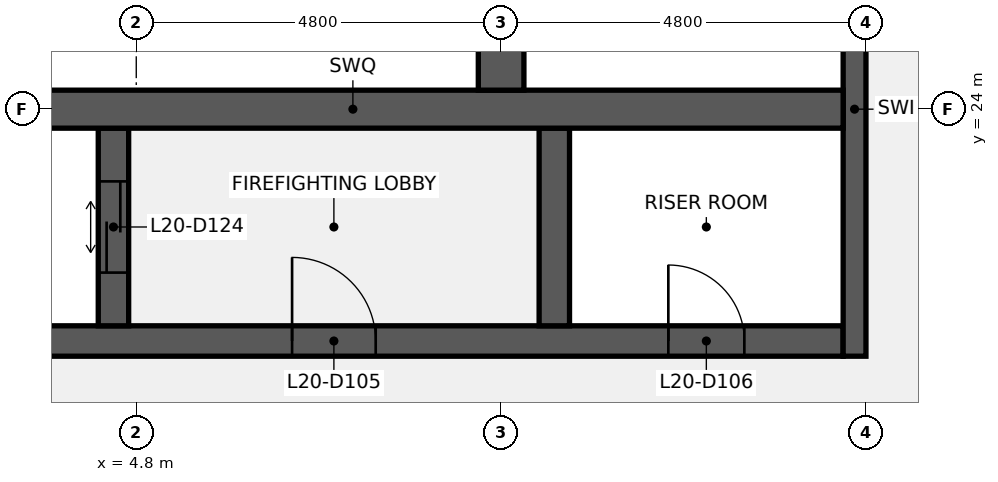
"""IFC4 building model, lengths in metres.
Left out: names, types, materials, properties, quantities, classifications, styles, units other than length and angle.
Written with IfcOpenShell. Run it as: python <this file> out.ifc"""

import sys

from ifc_helpers import new_model, si_unit, direction, frame, frame_2d, origin, place, context, subcontext, project, spatial, rectangle, extrude, element, fill, save


model = new_model("IFC4")
c1 = context("Model", 3, precision=1e-05, world=origin(), true_north=direction((0.0, 1.0)))
c2 = subcontext(c1, "Body", "Model", "MODEL_VIEW")
j1 = project(units=[si_unit("LENGTHUNIT", "METRE"), si_unit("PLANEANGLEUNIT", "RADIAN")], contexts=[c1])
p1 = place(None, origin())
s1 = spatial("IfcSite", under=j1, at=p1, CompositionType="ELEMENT")
p2 = place(p1, origin())
s2 = spatial("IfcBuilding", under=s1, at=p2, CompositionType="ELEMENT")
p3 = place(p2, frame((0.0, 0.0, 91.5)))
s3 = spatial("IfcBuildingStorey", under=s2, at=p3, CompositionType="ELEMENT", Elevation=91.5)
p4 = place(p3, frame((1.2, 20.95, 0.0), z_axis=(0.0, 0.0, 1.0), x_axis=(1.0, 0.0, 0.0)))
e1 = element("IfcWall", 1, at=p4, inside=s3, PredefinedType="SHEAR", context=c2, shape_type="SweptSolid", body=[
    extrude(rectangle(XDim=12.9, YDim=0.4, at=frame_2d((6.45, 0.0))), origin(), (0.0, 0.0, 1.0), 12.3),
])
p5 = place(p4, frame((5.65, 0.0, 0.0)))
e2 = element("IfcOpeningElement", 2, at=p5, cuts=e1, PredefinedType="OPENING", context=c2, shape_type="SweptSolid", body=[
    extrude(rectangle(XDim=1.1, YDim=2.1, at=frame_2d((0.55, 1.05))), frame((0.0, 0.21, 0.0), z_axis=(0.0, -1.0, 0.0), x_axis=(1.0, 0.0, 0.0)), (0.0, 0.0, 1.0), 0.42),
])
p6 = place(p4, frame((10.6, 0.0, 0.0)))
e3 = element("IfcOpeningElement", 3, at=p6, cuts=e1, PredefinedType="OPENING", context=c2, shape_type="SweptSolid", body=[
    extrude(rectangle(XDim=1.0, YDim=2.1, at=frame_2d((0.5, 1.05))), frame((0.0, 0.21, 0.0), z_axis=(0.0, -1.0, 0.0), x_axis=(1.0, 0.0, 0.0)), (0.0, 0.0, 1.0), 0.42),
])
p7 = place(p3, frame((14.25, 20.75, 0.0), z_axis=(0.0, 0.0, 1.0), x_axis=(0.0, 1.0, 0.0)))
e4 = element("IfcWall", 4, at=p7, inside=s3, PredefinedType="SHEAR", context=c2, shape_type="SweptSolid", body=[
    extrude(rectangle(XDim=6.5, YDim=0.3, at=frame_2d((3.25, 0.0))), origin(), (0.0, 0.0, 1.0), 12.3),
])
p8 = place(p3, frame((4.5, 21.15, 0.0), z_axis=(0.0, 0.0, 1.0), x_axis=(0.0, 1.0, 0.0)))
e5 = element("IfcWall", 5, at=p8, inside=s3, PredefinedType="SHEAR", context=c2, shape_type="SweptSolid", body=[
    extrude(rectangle(XDim=2.6, YDim=0.4, at=frame_2d((1.3, 0.0))), origin(), (0.0, 0.0, 1.0), 12.3),
])
p9 = place(p8, frame((0.7, 0.0, 0.0)))
e6 = element("IfcOpeningElement", 6, at=p9, cuts=e5, PredefinedType="OPENING", context=c2, shape_type="SweptSolid", body=[
    extrude(rectangle(XDim=1.2, YDim=2.1, at=frame_2d((0.6, 1.05))), frame((0.0, 0.21, 0.0), z_axis=(0.0, -1.0, 0.0), x_axis=(1.0, 0.0, 0.0)), (0.0, 0.0, 1.0), 0.42),
])
p10 = place(p3, frame((10.3, 21.15, 0.0), z_axis=(0.0, 0.0, 1.0), x_axis=(0.0, 1.0, 0.0)))
e7 = element("IfcWall", 7, at=p10, inside=s3, PredefinedType="SHEAR", context=c2, shape_type="SweptSolid", body=[
    extrude(rectangle(XDim=2.6, YDim=0.4, at=frame_2d((1.3, 0.0))), origin(), (0.0, 0.0, 1.0), 12.3),
])
p11 = place(p3, frame((1.2, 24.0, 0.0), z_axis=(0.0, 0.0, 1.0), x_axis=(1.0, 0.0, 0.0)))
e8 = element("IfcWall", 8, at=p11, inside=s3, PredefinedType="SHEAR", context=c2, shape_type="SweptSolid", body=[
    extrude(rectangle(XDim=12.9, YDim=0.5, at=frame_2d((6.45, 0.0))), origin(), (0.0, 0.0, 1.0), 12.3),
])
p12 = place(p3, frame((9.6, 24.25, 0.0), z_axis=(0.0, 0.0, 1.0), x_axis=(0.0, 1.0, 0.0)))
e9 = element("IfcWall", 9, at=p12, inside=s3, PredefinedType="SHEAR", context=c2, shape_type="SweptSolid", body=[
    extrude(rectangle(XDim=2.6, YDim=0.6, at=frame_2d((1.3, 0.0))), origin(), (0.0, 0.0, 1.0), 12.3),
])
p13 = place(p5, origin())
e10 = element("IfcDoor", 10, at=p13, inside=s3, OperationType="SINGLE_SWING_LEFT", PredefinedType="DOOR", context=c2, shape_type="SweptSolid", body=[
    extrude(rectangle(XDim=1.1, YDim=2.1, at=frame_2d((0.55, 1.05))), frame((0.0, 0.025, 0.0), z_axis=(0.0, -1.0, 0.0), x_axis=(1.0, 0.0, 0.0)), (0.0, 0.0, 1.0), 0.05),
])
fill(e2, e10)
p14 = place(p6, origin())
e11 = element("IfcDoor", 11, at=p14, inside=s3, OperationType="SINGLE_SWING_LEFT", PredefinedType="DOOR", context=c2, shape_type="SweptSolid", body=[
    extrude(rectangle(XDim=1.0, YDim=2.1, at=frame_2d((0.5, 1.05))), frame((0.0, 0.025, 0.0), z_axis=(0.0, -1.0, 0.0), x_axis=(1.0, 0.0, 0.0)), (0.0, 0.0, 1.0), 0.05),
])
fill(e3, e11)
p15 = place(p9, origin())
e12 = element("IfcDoor", 12, at=p15, inside=s3, OperationType="DOUBLE_DOOR_SLIDING", PredefinedType="DOOR", context=c2, shape_type="SweptSolid", body=[
    extrude(rectangle(XDim=1.2, YDim=2.1, at=frame_2d((0.6, 1.05))), frame((0.0, 0.025, 0.0), z_axis=(0.0, -1.0, 0.0), x_axis=(1.0, 0.0, 0.0)), (0.0, 0.0, 1.0), 0.05),
])
fill(e6, e12)
save(model, sys.argv[1])
